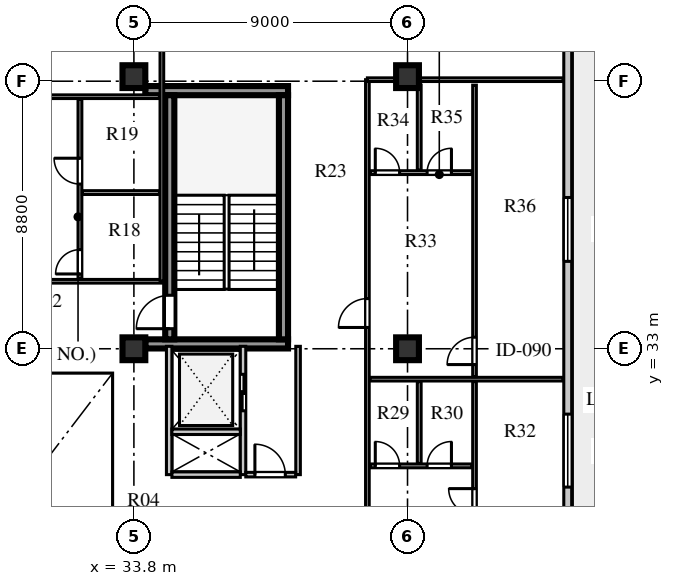
"""IFC4 building model, lengths in metres.
Left out: names, types, materials, properties, quantities, classifications, styles, units other than length and angle.
Written with IfcOpenShell. Run it as: python <this file> out.ifc"""

import sys

from ifc_helpers import new_model, si_unit, direction, frame, frame_2d, origin, origin_2d, place, context, subcontext, project, spatial, rectangle, extrude, element, fill, save


model = new_model("IFC4")
c1 = context("Model", 3, precision=1e-05, world=origin(), true_north=direction((0.0, 1.0)))
c2 = subcontext(c1, "Body", "Model", "MODEL_VIEW")
j1 = project(units=[si_unit("LENGTHUNIT", "METRE"), si_unit("PLANEANGLEUNIT", "RADIAN")], contexts=[c1])
p1 = place(None, origin())
s1 = spatial("IfcSite", under=j1, at=p1, CompositionType="ELEMENT")
p2 = place(p1, origin())
s2 = spatial("IfcBuilding", under=s1, at=p2, CompositionType="ELEMENT")
p3 = place(p2, frame((0.0, 0.0, 288.2)))
s3 = spatial("IfcBuildingStorey", under=s2, at=p3, CompositionType="ELEMENT", Elevation=288.2)
for number, where, z_axis, x_axis in (
    (1, (34.175, 33.16, 0.0), (0.0, 0.0, 1.0), (1.0, 0.0, 0.0)),
    (2, (34.175, 41.49, 0.0), (0.0, 0.0, 1.0), (1.0, 0.0, 0.0)),
):
    element("IfcWall", number, at=place(p3, frame(where, z_axis=z_axis, x_axis=x_axis)), inside=s3, PredefinedType="SHEAR", context=c2, shape_type="SweptSolid", body=[
        extrude(rectangle(XDim=4.695, YDim=0.3, at=frame_2d((2.348, 0.0))), origin(), (0.0, 0.0, 1.0), 3.66),
    ])
p4 = place(p3, frame((34.98, 33.31, 0.0), z_axis=(0.0, 0.0, 1.0), x_axis=(0.0, 1.0, 0.0)))
e3 = element("IfcWall", 3, at=p4, inside=s3, PredefinedType="SHEAR", context=c2, shape_type="SweptSolid", body=[
    extrude(rectangle(XDim=8.03, YDim=0.3, at=frame_2d((4.015, 0.0))), origin(), (0.0, 0.0, 1.0), 3.66),
])
p5 = place(p4, frame((0.35, 0.0, 0.0)))
e4 = element("IfcOpeningElement", 4, at=p5, cuts=e3, PredefinedType="OPENING", context=c2, shape_type="SweptSolid", body=[
    extrude(rectangle(XDim=1.1, YDim=2.1, at=frame_2d((0.55, 1.05))), frame((0.0, 0.16, 0.0), z_axis=(0.0, -1.0, 0.0), x_axis=(1.0, 0.0, 0.0)), (0.0, 0.0, 1.0), 0.32),
])
p6 = place(p3, frame((38.72, 33.31, 0.0), z_axis=(0.0, 0.0, 1.0), x_axis=(0.0, 1.0, 0.0)))
e5 = element("IfcWall", 5, at=p6, inside=s3, PredefinedType="SHEAR", context=c2, shape_type="SweptSolid", body=[
    extrude(rectangle(XDim=8.03, YDim=0.3, at=frame_2d((4.015, 0.0))), origin(), (0.0, 0.0, 1.0), 3.66),
])
for number, where, z_axis, x_axis in (
    (6, (33.8, 33.0, 0.0), (0.0, 0.0, 1.0), (1.0, 0.0, 0.0)),
    (7, (33.8, 41.95, 0.0), (0.0, 0.0, 1.0), (1.0, 0.0, 0.0)),
    (8, (42.8, 33.0, 0.0), (0.0, 0.0, 1.0), (1.0, 0.0, 0.0)),
    (9, (42.8, 41.95, 0.0), (0.0, 0.0, 1.0), (1.0, 0.0, 0.0)),
):
    element("IfcColumn", number, at=place(p3, frame(where, z_axis=z_axis, x_axis=x_axis)), inside=s3, PredefinedType="COLUMN", context=c2, shape_type="SweptSolid", body=[
        extrude(rectangle(XDim=0.75, YDim=0.75, at=origin_2d()), origin(), (0.0, 0.0, 1.0), 3.66),
    ])
p7 = place(p3, frame((48.07, 13.41, 0.0), z_axis=(0.0, 0.0, 1.0), x_axis=(0.0, 1.0, 0.0)))
e10 = element("IfcWall", 10, at=p7, inside=s3, PredefinedType="SOLIDWALL", context=c2, shape_type="SweptSolid", body=[
    extrude(rectangle(XDim=30.38, YDim=0.26, at=frame_2d((15.19, 0.0))), origin(), (0.0, 0.0, 1.0), 3.66),
])
p8 = place(p7, frame((2.43, 0.0, 0.0)))
e11 = element("IfcOpeningElement", 11, at=p8, cuts=e10, PredefinedType="OPENING", context=c2, shape_type="SweptSolid", body=[
    extrude(rectangle(XDim=1.0, YDim=2.05, at=frame_2d((0.5, 1.025))), frame((0.0, 0.14, 0.0), z_axis=(0.0, -1.0, 0.0), x_axis=(1.0, 0.0, 0.0)), (0.0, 0.0, 1.0), 0.28),
])
p9 = place(p7, frame((5.59, 0.0, 0.8)))
e12 = element("IfcOpeningElement", 12, at=p9, cuts=e10, PredefinedType="OPENING", context=c2, shape_type="SweptSolid", body=[
    extrude(rectangle(XDim=1.5, YDim=2.0, at=frame_2d((0.75, 1.0))), frame((0.0, 0.14, 0.0), z_axis=(0.0, -1.0, 0.0), x_axis=(1.0, 0.0, 0.0)), (0.0, 0.0, 1.0), 0.28),
])
p10 = place(p7, frame((10.94, 0.0, 0.8)))
e13 = element("IfcOpeningElement", 13, at=p10, cuts=e10, PredefinedType="OPENING", context=c2, shape_type="SweptSolid", body=[
    extrude(rectangle(XDim=1.2, YDim=1.75, at=frame_2d((0.6, 0.875))), frame((0.0, 0.14, 0.0), z_axis=(0.0, -1.0, 0.0), x_axis=(1.0, 0.0, 0.0)), (0.0, 0.0, 1.0), 0.28),
])
p11 = place(p7, frame((15.04, 0.0, 0.8)))
e14 = element("IfcOpeningElement", 14, at=p11, cuts=e10, PredefinedType="OPENING", context=c2, shape_type="SweptSolid", body=[
    extrude(rectangle(XDim=2.4, YDim=2.05, at=frame_2d((1.2, 1.025))), frame((0.0, 0.14, 0.0), z_axis=(0.0, -1.0, 0.0), x_axis=(1.0, 0.0, 0.0)), (0.0, 0.0, 1.0), 0.28),
])
p12 = place(p7, frame((22.465, 0.0, 0.8)))
e15 = element("IfcOpeningElement", 15, at=p12, cuts=e10, PredefinedType="OPENING", context=c2, shape_type="SweptSolid", body=[
    extrude(rectangle(XDim=2.1, YDim=1.95, at=frame_2d((1.05, 0.975))), frame((0.0, 0.14, 0.0), z_axis=(0.0, -1.0, 0.0), x_axis=(1.0, 0.0, 0.0)), (0.0, 0.0, 1.0), 0.28),
])
p13 = place(p3, frame((34.96, 28.86, 0.0), z_axis=(0.0, 0.0, 1.0), x_axis=(0.0, 1.0, 0.0)))
e16 = element("IfcWall", 16, at=p13, inside=s3, PredefinedType="SOLIDWALL", context=c2, shape_type="SweptSolid", body=[
    extrude(rectangle(XDim=4.22, YDim=0.18, at=frame_2d((2.11, 0.0))), origin(), (0.0, 0.0, 1.0), 3.66),
])
p14 = place(p3, frame((37.39, 28.86, 0.0), z_axis=(0.0, 0.0, 1.0), x_axis=(0.0, 1.0, 0.0)))
e17 = element("IfcWall", 17, at=p14, inside=s3, PredefinedType="SOLIDWALL", context=c2, shape_type="SweptSolid", body=[
    extrude(rectangle(XDim=4.22, YDim=0.18, at=frame_2d((2.11, 0.0))), origin(), (0.0, 0.0, 1.0), 3.66),
])
p15 = place(p14, frame((2.1, 0.0, 0.0)))
e18 = element("IfcOpeningElement", 18, at=p15, cuts=e17, PredefinedType="OPENING", context=c2, shape_type="SweptSolid", body=[
    extrude(rectangle(XDim=1.2, YDim=2.12, at=frame_2d((0.6, 1.06))), frame((0.0, 0.1, 0.0), z_axis=(0.0, -1.0, 0.0), x_axis=(1.0, 0.0, 0.0)), (0.0, 0.0, 1.0), 0.2),
])
for number, where, z_axis, x_axis in (
    (19, (35.05, 28.86, 0.0), (0.0, 0.0, 1.0), (1.0, 0.0, 0.0)),
    (20, (35.05, 30.27, 0.0), (0.0, 0.0, 1.0), (1.0, 0.0, 0.0)),
):
    element("IfcWall", number, at=place(p3, frame(where, z_axis=z_axis, x_axis=x_axis)), inside=s3, PredefinedType="SOLIDWALL", context=c2, shape_type="SweptSolid", body=[
        extrude(rectangle(XDim=2.25, YDim=0.18, at=frame_2d((1.125, 0.0))), origin(), (0.0, 0.0, 1.0), 3.66),
    ])
p16 = place(p3, frame((39.2, 28.86, 0.0), z_axis=(0.0, 0.0, 1.0), x_axis=(0.0, 1.0, 0.0)))
e21 = element("IfcWall", 21, at=p16, inside=s3, PredefinedType="PARTITIONING", context=c2, shape_type="SweptSolid", body=[
    extrude(rectangle(XDim=4.22, YDim=0.15, at=frame_2d((2.11, 0.0))), origin(), (0.0, 0.0, 1.0), 3.66),
])
p17 = place(p3, frame((37.48, 28.86, 0.0), z_axis=(0.0, 0.0, 1.0), x_axis=(1.0, 0.0, 0.0)))
e22 = element("IfcWall", 22, at=p17, inside=s3, PredefinedType="PARTITIONING", context=c2, shape_type="SweptSolid", body=[
    extrude(rectangle(XDim=1.64, YDim=0.15, at=frame_2d((0.82, 0.0))), origin(), (0.0, 0.0, 1.0), 3.66),
])
p18 = place(p17, frame((0.3, 0.0, 0.0)))
e23 = element("IfcOpeningElement", 23, at=p18, cuts=e22, PredefinedType="OPENING", context=c2, shape_type="SweptSolid", body=[
    extrude(rectangle(XDim=1.0, YDim=2.1, at=frame_2d((0.5, 1.05))), frame((0.0, 0.085, 0.0), z_axis=(0.0, -1.0, 0.0), x_axis=(1.0, 0.0, 0.0)), (0.0, 0.0, 1.0), 0.17),
])
p19 = place(p3, frame((25.22, 35.22, 0.0), z_axis=(0.0, 0.0, 1.0), x_axis=(1.0, 0.0, 0.0)))
e24 = element("IfcWall", 24, at=p19, inside=s3, PredefinedType="PARTITIONING", context=c2, shape_type="SweptSolid", body=[
    extrude(rectangle(XDim=9.5, YDim=0.12, at=frame_2d((4.75, 0.0))), origin(), (0.0, 0.0, 1.0), 3.66),
])
p20 = place(p19, frame((1.1, 0.0, 0.0)))
e25 = element("IfcOpeningElement", 25, at=p20, cuts=e24, PredefinedType="OPENING", context=c2, shape_type="SweptSolid", body=[
    extrude(rectangle(XDim=0.95, YDim=2.1, at=frame_2d((0.475, 1.05))), frame((0.0, 0.07, 0.0), z_axis=(0.0, -1.0, 0.0), x_axis=(1.0, 0.0, 0.0)), (0.0, 0.0, 1.0), 0.14),
])
p21 = place(p3, frame((34.72, 35.22, 0.0), z_axis=(0.0, 0.0, 1.0), x_axis=(0.0, 1.0, 0.0)))
e26 = element("IfcWall", 26, at=p21, inside=s3, PredefinedType="PARTITIONING", context=c2, shape_type="SweptSolid", body=[
    extrude(rectangle(XDim=11.6, YDim=0.12, at=frame_2d((5.8, 0.0))), origin(), (0.0, 0.0, 1.0), 3.66),
])
p22 = place(p3, frame((25.3, 41.29, 0.0), z_axis=(0.0, 0.0, 1.0), x_axis=(1.0, 0.0, 0.0)))
e27 = element("IfcWall", 27, at=p22, inside=s3, PredefinedType="PARTITIONING", context=c2, shape_type="SweptSolid", body=[
    extrude(rectangle(XDim=9.34, YDim=0.12, at=frame_2d((4.67, 0.0))), origin(), (0.0, 0.0, 1.0), 3.66),
])
p23 = place(p22, frame((0.6, 0.0, 0.0)))
e28 = element("IfcOpeningElement", 28, at=p23, cuts=e27, PredefinedType="OPENING", context=c2, shape_type="SweptSolid", body=[
    extrude(rectangle(XDim=0.85, YDim=2.08, at=frame_2d((0.425, 1.04))), frame((0.0, 0.07, 0.0), z_axis=(0.0, -1.0, 0.0), x_axis=(1.0, 0.0, 0.0)), (0.0, 0.0, 1.0), 0.14),
])
p24 = place(p22, frame((3.573, 0.0, 0.0)))
e29 = element("IfcOpeningElement", 29, at=p24, cuts=e27, PredefinedType="OPENING", context=c2, shape_type="SweptSolid", body=[
    extrude(rectangle(XDim=0.85, YDim=2.08, at=frame_2d((0.425, 1.04))), frame((0.0, 0.07, 0.0), z_axis=(0.0, -1.0, 0.0), x_axis=(1.0, 0.0, 0.0)), (0.0, 0.0, 1.0), 0.14),
])
p25 = place(p3, frame((32.025, 35.3, 0.0), z_axis=(0.0, 0.0, 1.0), x_axis=(0.0, 1.0, 0.0)))
e30 = element("IfcWall", 30, at=p25, inside=s3, PredefinedType="PLUMBINGWALL", context=c2, shape_type="SweptSolid", body=[
    extrude(rectangle(XDim=5.91, YDim=0.125, at=frame_2d((2.955, 0.0))), origin(), (0.0, 0.0, 1.0), 3.66),
])
p26 = place(p25, frame((0.16, 0.0, 0.0)))
e31 = element("IfcOpeningElement", 31, at=p26, cuts=e30, PredefinedType="OPENING", context=c2, shape_type="SweptSolid", body=[
    extrude(rectangle(XDim=0.8, YDim=2.05, at=frame_2d((0.4, 1.025))), frame((0.0, 0.073, 0.0), z_axis=(0.0, -1.0, 0.0), x_axis=(1.0, 0.0, 0.0)), (0.0, 0.0, 1.0), 0.145),
])
p27 = place(p25, frame((3.117, 0.0, 0.0)))
e32 = element("IfcOpeningElement", 32, at=p27, cuts=e30, PredefinedType="OPENING", context=c2, shape_type="SweptSolid", body=[
    extrude(rectangle(XDim=0.85, YDim=2.08, at=frame_2d((0.425, 1.04))), frame((0.0, 0.073, 0.0), z_axis=(0.0, -1.0, 0.0), x_axis=(1.0, 0.0, 0.0)), (0.0, 0.0, 1.0), 0.145),
])
p28 = place(p3, frame((32.105, 38.137, 0.0), z_axis=(0.0, 0.0, 1.0), x_axis=(1.0, 0.0, 0.0)))
e33 = element("IfcWall", 33, at=p28, inside=s3, PredefinedType="PLUMBINGWALL", context=c2, shape_type="SweptSolid", body=[
    extrude(rectangle(XDim=2.535, YDim=0.125, at=frame_2d((1.268, 0.0))), origin(), (0.0, 0.0, 1.0), 3.66),
])
p29 = place(p3, frame((41.48, 15.35, 0.0), z_axis=(0.0, 0.0, 1.0), x_axis=(0.0, 1.0, 0.0)))
e34 = element("IfcWall", 34, at=p29, inside=s3, PredefinedType="PARTITIONING", context=c2, shape_type="SweptSolid", body=[
    extrude(rectangle(XDim=26.5, YDim=0.12, at=frame_2d((13.25, 0.0))), origin(), (0.0, 0.0, 1.0), 3.66),
])
p30 = place(p29, frame((0.75, 0.0, 0.0)))
e35 = element("IfcOpeningElement", 35, at=p30, cuts=e34, PredefinedType="OPENING", context=c2, shape_type="SweptSolid", body=[
    extrude(rectangle(XDim=0.95, YDim=2.1, at=frame_2d((0.475, 1.05))), frame((0.0, 0.07, 0.0), z_axis=(0.0, -1.0, 0.0), x_axis=(1.0, 0.0, 0.0)), (0.0, 0.0, 1.0), 0.14),
])
p31 = place(p29, frame((9.9, 0.0, 0.0)))
e36 = element("IfcOpeningElement", 36, at=p31, cuts=e34, PredefinedType="OPENING", context=c2, shape_type="SweptSolid", body=[
    extrude(rectangle(XDim=0.95, YDim=2.1, at=frame_2d((0.475, 1.05))), frame((0.0, 0.07, 0.0), z_axis=(0.0, -1.0, 0.0), x_axis=(1.0, 0.0, 0.0)), (0.0, 0.0, 1.0), 0.14),
])
p32 = place(p29, frame((18.35, 0.0, 0.0)))
e37 = element("IfcOpeningElement", 37, at=p32, cuts=e34, PredefinedType="OPENING", context=c2, shape_type="SweptSolid", body=[
    extrude(rectangle(XDim=0.95, YDim=2.1, at=frame_2d((0.475, 1.05))), frame((0.0, 0.07, 0.0), z_axis=(0.0, -1.0, 0.0), x_axis=(1.0, 0.0, 0.0)), (0.0, 0.0, 1.0), 0.14),
])
p33 = place(p3, frame((41.48, 41.85, 0.0), z_axis=(0.0, 0.0, 1.0), x_axis=(1.0, 0.0, 0.0)))
e38 = element("IfcWall", 38, at=p33, inside=s3, PredefinedType="PARTITIONING", context=c2, shape_type="SweptSolid", body=[
    extrude(rectangle(XDim=6.44, YDim=0.12, at=frame_2d((3.22, 0.0))), origin(), (0.0, 0.0, 1.0), 3.06),
])
p34 = place(p3, frame((45.004, 22.68, 0.0), z_axis=(0.0, 0.0, 1.0), x_axis=(0.0, 1.0, 0.0)))
e39 = element("IfcWall", 39, at=p34, inside=s3, PredefinedType="PARTITIONING", context=c2, shape_type="SweptSolid", body=[
    extrude(rectangle(XDim=9.24, YDim=0.12, at=frame_2d((4.62, 0.0))), origin(), (0.0, 0.0, 1.0), 3.66),
])
p35 = place(p34, frame((3.57, 0.0, 0.0)))
e40 = element("IfcOpeningElement", 40, at=p35, cuts=e39, PredefinedType="OPENING", context=c2, shape_type="SweptSolid", body=[
    extrude(rectangle(XDim=0.85, YDim=2.08, at=frame_2d((0.425, 1.04))), frame((0.0, 0.07, 0.0), z_axis=(0.0, -1.0, 0.0), x_axis=(1.0, 0.0, 0.0)), (0.0, 0.0, 1.0), 0.14),
])
p36 = place(p34, frame((4.87, 0.0, 0.0)))
e41 = element("IfcOpeningElement", 41, at=p36, cuts=e39, PredefinedType="OPENING", context=c2, shape_type="SweptSolid", body=[
    extrude(rectangle(XDim=0.85, YDim=2.08, at=frame_2d((0.425, 1.04))), frame((0.0, 0.07, 0.0), z_axis=(0.0, -1.0, 0.0), x_axis=(1.0, 0.0, 0.0)), (0.0, 0.0, 1.0), 0.14),
])
p37 = place(p3, frame((41.58, 29.148, 0.0), z_axis=(0.0, 0.0, 1.0), x_axis=(1.0, 0.0, 0.0)))
e42 = element("IfcWall", 42, at=p37, inside=s3, PredefinedType="PLUMBINGWALL", context=c2, shape_type="SweptSolid", body=[
    extrude(rectangle(XDim=3.344, YDim=0.125, at=frame_2d((1.672, 0.0))), origin(), (0.0, 0.0, 1.0), 3.66),
])
p38 = place(p37, frame((0.16, 0.0, 0.0)))
e43 = element("IfcOpeningElement", 43, at=p38, cuts=e42, PredefinedType="OPENING", context=c2, shape_type="SweptSolid", body=[
    extrude(rectangle(XDim=0.8, YDim=2.05, at=frame_2d((0.4, 1.025))), frame((0.0, 0.073, 0.0), z_axis=(0.0, -1.0, 0.0), x_axis=(1.0, 0.0, 0.0)), (0.0, 0.0, 1.0), 0.145),
])
p39 = place(p37, frame((1.865, 0.0, 0.0)))
e44 = element("IfcOpeningElement", 44, at=p39, cuts=e42, PredefinedType="OPENING", context=c2, shape_type="SweptSolid", body=[
    extrude(rectangle(XDim=0.8, YDim=2.05, at=frame_2d((0.4, 1.025))), frame((0.0, 0.073, 0.0), z_axis=(0.0, -1.0, 0.0), x_axis=(1.0, 0.0, 0.0)), (0.0, 0.0, 1.0), 0.145),
])
p40 = place(p3, frame((43.185, 29.228, 0.0), z_axis=(0.0, 0.0, 1.0), x_axis=(0.0, 1.0, 0.0)))
e45 = element("IfcWall", 45, at=p40, inside=s3, PredefinedType="PLUMBINGWALL", context=c2, shape_type="SweptSolid", body=[
    extrude(rectangle(XDim=2.692, YDim=0.125, at=frame_2d((1.346, 0.0))), origin(), (0.0, 0.0, 1.0), 3.66),
])
p41 = place(p3, frame((41.56, 32.0, 0.0), z_axis=(0.0, 0.0, 1.0), x_axis=(1.0, 0.0, 0.0)))
e46 = element("IfcWall", 46, at=p41, inside=s3, PredefinedType="PARTITIONING", context=c2, shape_type="SweptSolid", body=[
    extrude(rectangle(XDim=6.36, YDim=0.12, at=frame_2d((3.18, 0.0))), origin(), (0.0, 0.0, 1.0), 3.66),
])
p42 = place(p3, frame((45.004, 32.08, 0.0), z_axis=(0.0, 0.0, 1.0), x_axis=(0.0, 1.0, 0.0)))
e47 = element("IfcWall", 47, at=p42, inside=s3, PredefinedType="PARTITIONING", context=c2, shape_type="SweptSolid", body=[
    extrude(rectangle(XDim=9.59, YDim=0.12, at=frame_2d((4.795, 0.0))), origin(), (0.0, 0.0, 1.0), 3.66),
])
p43 = place(p42, frame((0.4, 0.0, 0.0)))
e48 = element("IfcOpeningElement", 48, at=p43, cuts=e47, PredefinedType="OPENING", context=c2, shape_type="SweptSolid", body=[
    extrude(rectangle(XDim=0.9, YDim=2.08, at=frame_2d((0.45, 1.04))), frame((0.0, 0.07, 0.0), z_axis=(0.0, -1.0, 0.0), x_axis=(1.0, 0.0, 0.0)), (0.0, 0.0, 1.0), 0.14),
])
p44 = place(p3, frame((41.58, 38.793, 0.0), z_axis=(0.0, 0.0, 1.0), x_axis=(1.0, 0.0, 0.0)))
e49 = element("IfcWall", 49, at=p44, inside=s3, PredefinedType="PLUMBINGWALL", context=c2, shape_type="SweptSolid", body=[
    extrude(rectangle(XDim=3.344, YDim=0.125, at=frame_2d((1.672, 0.0))), origin(), (0.0, 0.0, 1.0), 3.66),
])
p45 = place(p44, frame((0.16, 0.0, 0.0)))
e50 = element("IfcOpeningElement", 50, at=p45, cuts=e49, PredefinedType="OPENING", context=c2, shape_type="SweptSolid", body=[
    extrude(rectangle(XDim=0.8, YDim=2.05, at=frame_2d((0.4, 1.025))), frame((0.0, 0.073, 0.0), z_axis=(0.0, -1.0, 0.0), x_axis=(1.0, 0.0, 0.0)), (0.0, 0.0, 1.0), 0.145),
])
p46 = place(p44, frame((1.865, 0.0, 0.0)))
e51 = element("IfcOpeningElement", 51, at=p46, cuts=e49, PredefinedType="OPENING", context=c2, shape_type="SweptSolid", body=[
    extrude(rectangle(XDim=0.8, YDim=2.05, at=frame_2d((0.4, 1.025))), frame((0.0, 0.073, 0.0), z_axis=(0.0, -1.0, 0.0), x_axis=(1.0, 0.0, 0.0)), (0.0, 0.0, 1.0), 0.145),
])
p47 = place(p3, frame((43.185, 38.873, 0.0), z_axis=(0.0, 0.0, 1.0), x_axis=(0.0, 1.0, 0.0)))
e52 = element("IfcWall", 52, at=p47, inside=s3, PredefinedType="PLUMBINGWALL", context=c2, shape_type="SweptSolid", body=[
    extrude(rectangle(XDim=2.797, YDim=0.125, at=frame_2d((1.398, 0.0))), origin(), (0.0, 0.0, 1.0), 3.66),
])
p48 = place(p11, origin())
e53 = element("IfcWindow", 53, at=p48, inside=s3, PartitioningType="SINGLE_PANEL", PredefinedType="WINDOW", context=c2, shape_type="SweptSolid", body=[
    extrude(rectangle(XDim=2.4, YDim=2.05, at=frame_2d((1.2, 1.025))), frame((0.0, 0.03, 0.0), z_axis=(0.0, -1.0, 0.0), x_axis=(1.0, 0.0, 0.0)), (0.0, 0.0, 1.0), 0.06),
])
fill(e14, e53)
p49 = place(p12, origin())
e54 = element("IfcWindow", 54, at=p49, inside=s3, PartitioningType="SINGLE_PANEL", PredefinedType="WINDOW", context=c2, shape_type="SweptSolid", body=[
    extrude(rectangle(XDim=2.1, YDim=1.95, at=frame_2d((1.05, 0.975))), frame((0.0, 0.03, 0.0), z_axis=(0.0, -1.0, 0.0), x_axis=(1.0, 0.0, 0.0)), (0.0, 0.0, 1.0), 0.06),
])
fill(e15, e54)
p50 = place(p5, origin())
e55 = element("IfcDoor", 55, at=p50, inside=s3, OperationType="SINGLE_SWING_LEFT", PredefinedType="DOOR", context=c2, shape_type="SweptSolid", body=[
    extrude(rectangle(XDim=1.1, YDim=2.1, at=frame_2d((0.55, 1.05))), frame((0.0, 0.025, 0.0), z_axis=(0.0, -1.0, 0.0), x_axis=(1.0, 0.0, 0.0)), (0.0, 0.0, 1.0), 0.05),
])
fill(e4, e55)
p51 = place(p15, frame((1.2, 0.0, 0.0), z_axis=(0.0, 0.0, 1.0), x_axis=(-1.0, 0.0, 0.0)))
e56 = element("IfcDoor", 56, at=p51, inside=s3, OperationType="DOUBLE_DOOR_SLIDING", PredefinedType="DOOR", context=c2, shape_type="SweptSolid", body=[
    extrude(rectangle(XDim=1.2, YDim=2.12, at=frame_2d((0.6, 1.06))), frame((0.0, 0.025, 0.0), z_axis=(0.0, -1.0, 0.0), x_axis=(1.0, 0.0, 0.0)), (0.0, 0.0, 1.0), 0.05),
])
fill(e18, e56)
p52 = place(p18, origin())
e57 = element("IfcDoor", 57, at=p52, inside=s3, OperationType="SINGLE_SWING_LEFT", PredefinedType="DOOR", context=c2, shape_type="SweptSolid", body=[
    extrude(rectangle(XDim=1.0, YDim=2.1, at=frame_2d((0.5, 1.05))), frame((0.0, 0.025, 0.0), z_axis=(0.0, -1.0, 0.0), x_axis=(1.0, 0.0, 0.0)), (0.0, 0.0, 1.0), 0.05),
])
fill(e23, e57)
p53 = place(p26, origin())
e58 = element("IfcDoor", 58, at=p53, inside=s3, OperationType="SINGLE_SWING_LEFT", PredefinedType="DOOR", context=c2, shape_type="SweptSolid", body=[
    extrude(rectangle(XDim=0.8, YDim=2.05, at=frame_2d((0.4, 1.025))), frame((0.0, 0.025, 0.0), z_axis=(0.0, -1.0, 0.0), x_axis=(1.0, 0.0, 0.0)), (0.0, 0.0, 1.0), 0.05),
])
fill(e31, e58)
p54 = place(p27, origin())
e59 = element("IfcDoor", 59, at=p54, inside=s3, OperationType="SINGLE_SWING_RIGHT", PredefinedType="DOOR", context=c2, shape_type="SweptSolid", body=[
    extrude(rectangle(XDim=0.85, YDim=2.08, at=frame_2d((0.425, 1.04))), frame((0.0, 0.025, 0.0), z_axis=(0.0, -1.0, 0.0), x_axis=(1.0, 0.0, 0.0)), (0.0, 0.0, 1.0), 0.05),
])
fill(e32, e59)
p55 = place(p38, origin())
e60 = element("IfcDoor", 60, at=p55, inside=s3, OperationType="SINGLE_SWING_LEFT", PredefinedType="DOOR", context=c2, shape_type="SweptSolid", body=[
    extrude(rectangle(XDim=0.8, YDim=2.05, at=frame_2d((0.4, 1.025))), frame((0.0, 0.025, 0.0), z_axis=(0.0, -1.0, 0.0), x_axis=(1.0, 0.0, 0.0)), (0.0, 0.0, 1.0), 0.05),
])
fill(e43, e60)
p56 = place(p39, origin())
e61 = element("IfcDoor", 61, at=p56, inside=s3, OperationType="SINGLE_SWING_RIGHT", PredefinedType="DOOR", context=c2, shape_type="SweptSolid", body=[
    extrude(rectangle(XDim=0.8, YDim=2.05, at=frame_2d((0.4, 1.025))), frame((0.0, 0.025, 0.0), z_axis=(0.0, -1.0, 0.0), x_axis=(1.0, 0.0, 0.0)), (0.0, 0.0, 1.0), 0.05),
])
fill(e44, e61)
p57 = place(p36, origin())
e62 = element("IfcDoor", 62, at=p57, inside=s3, OperationType="SINGLE_SWING_RIGHT", PredefinedType="DOOR", context=c2, shape_type="SweptSolid", body=[
    extrude(rectangle(XDim=0.85, YDim=2.08, at=frame_2d((0.425, 1.04))), frame((0.0, 0.025, 0.0), z_axis=(0.0, -1.0, 0.0), x_axis=(1.0, 0.0, 0.0)), (0.0, 0.0, 1.0), 0.05),
])
fill(e41, e62)
p58 = place(p45, origin())
e63 = element("IfcDoor", 63, at=p58, inside=s3, OperationType="SINGLE_SWING_LEFT", PredefinedType="DOOR", context=c2, shape_type="SweptSolid", body=[
    extrude(rectangle(XDim=0.8, YDim=2.05, at=frame_2d((0.4, 1.025))), frame((0.0, 0.025, 0.0), z_axis=(0.0, -1.0, 0.0), x_axis=(1.0, 0.0, 0.0)), (0.0, 0.0, 1.0), 0.05),
])
fill(e50, e63)
p59 = place(p46, origin())
e64 = element("IfcDoor", 64, at=p59, inside=s3, OperationType="SINGLE_SWING_RIGHT", PredefinedType="DOOR", context=c2, shape_type="SweptSolid", body=[
    extrude(rectangle(XDim=0.8, YDim=2.05, at=frame_2d((0.4, 1.025))), frame((0.0, 0.025, 0.0), z_axis=(0.0, -1.0, 0.0), x_axis=(1.0, 0.0, 0.0)), (0.0, 0.0, 1.0), 0.05),
])
fill(e51, e64)
p60 = place(p43, origin())
e65 = element("IfcDoor", 65, at=p60, inside=s3, OperationType="SINGLE_SWING_LEFT", PredefinedType="DOOR", context=c2, shape_type="SweptSolid", body=[
    extrude(rectangle(XDim=0.9, YDim=2.08, at=frame_2d((0.45, 1.04))), frame((0.0, 0.025, 0.0), z_axis=(0.0, -1.0, 0.0), x_axis=(1.0, 0.0, 0.0)), (0.0, 0.0, 1.0), 0.05),
])
fill(e48, e65)
p61 = place(p32, origin())
e66 = element("IfcDoor", 66, at=p61, inside=s3, OperationType="SINGLE_SWING_LEFT", PredefinedType="DOOR", context=c2, shape_type="SweptSolid", body=[
    extrude(rectangle(XDim=0.95, YDim=2.1, at=frame_2d((0.475, 1.05))), frame((0.0, 0.025, 0.0), z_axis=(0.0, -1.0, 0.0), x_axis=(1.0, 0.0, 0.0)), (0.0, 0.0, 1.0), 0.05),
])
fill(e37, e66)
save(model, sys.argv[1])
